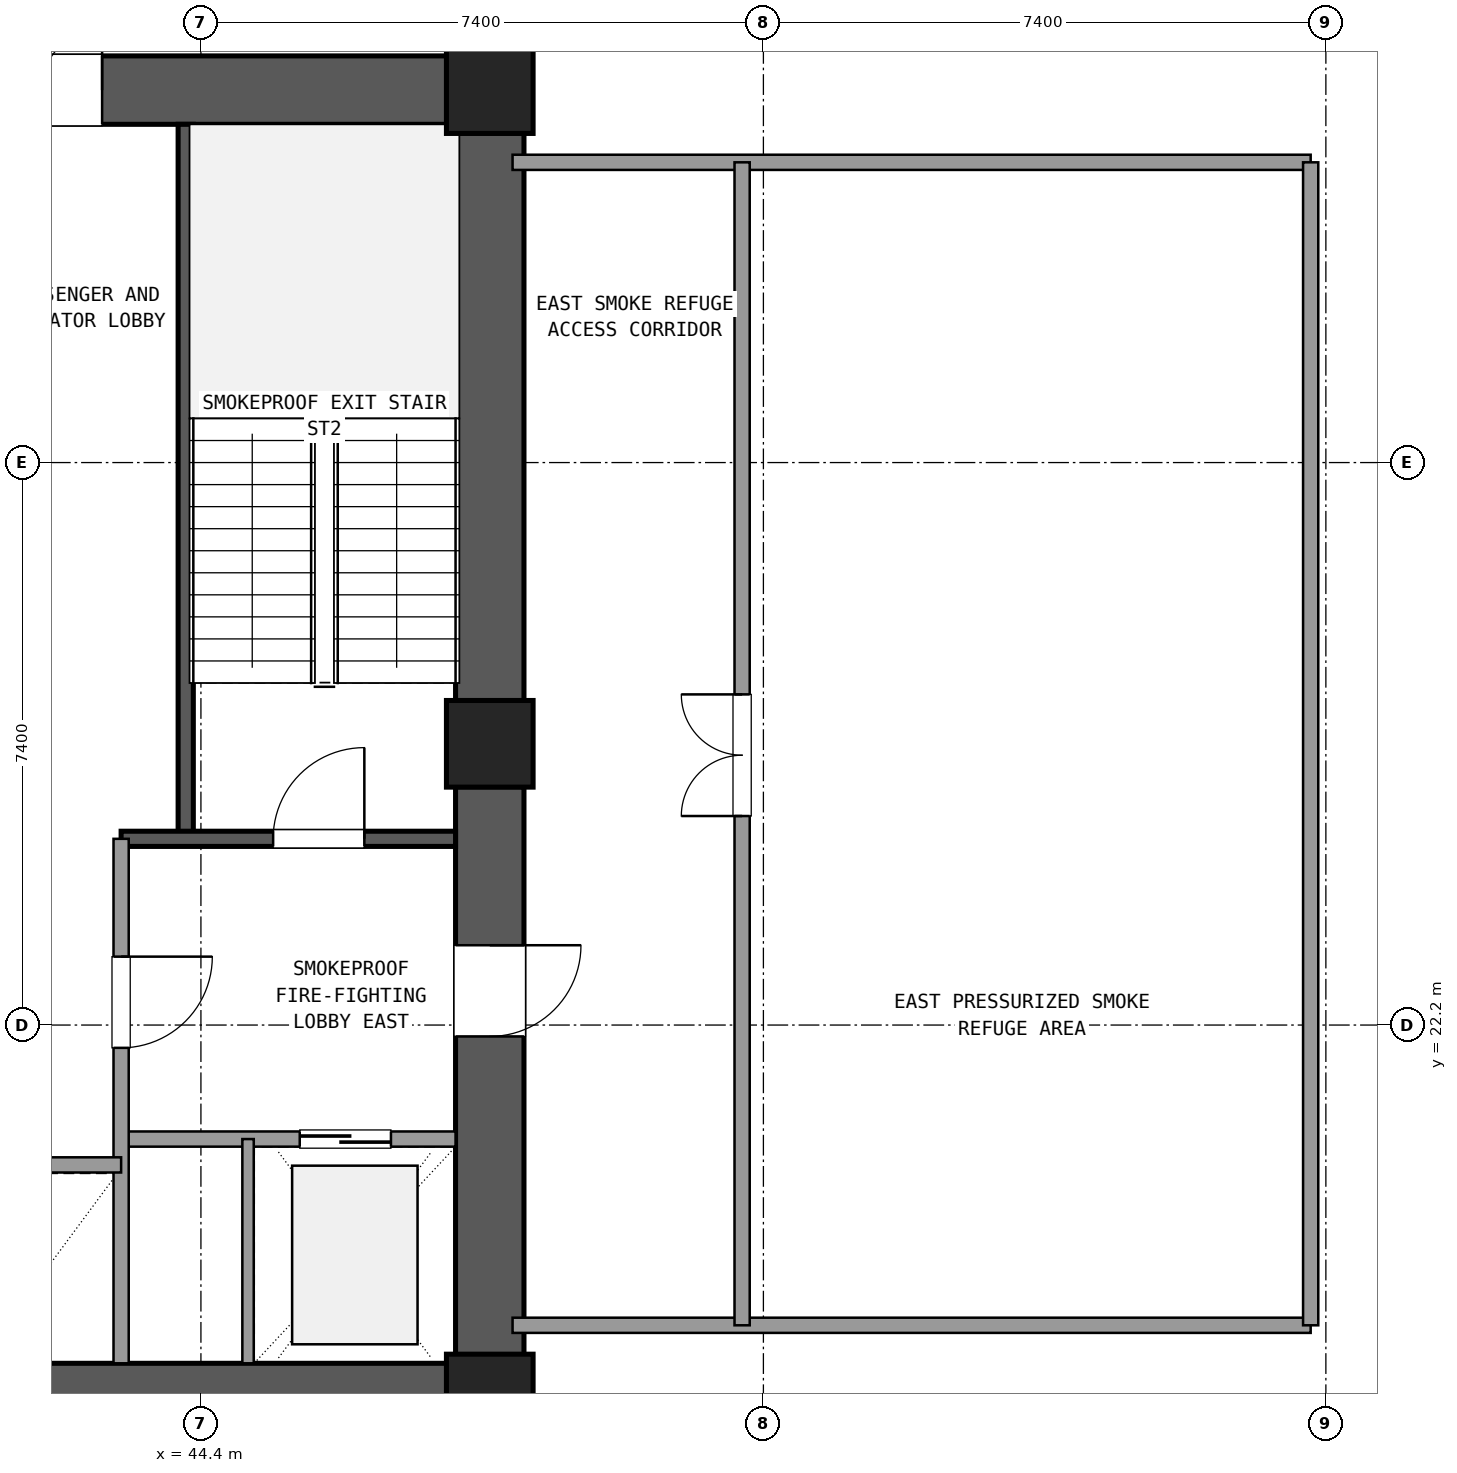
"""IFC4 building model, lengths in metres.
Left out: names, types, materials, properties, quantities, classifications, styles, units other than length and angle.
Written with IfcOpenShell. Run it as: python <this file> out.ifc"""

import sys

from ifc_helpers import new_model, si_unit, direction, frame, frame_2d, origin, origin_2d, place, context, subcontext, project, spatial, rectangle, extrude, element, fill, save


model = new_model("IFC4")
c1 = context("Model", 3, precision=1e-05, world=origin(), true_north=direction((0.0, 1.0)))
c2 = subcontext(c1, "Body", "Model", "MODEL_VIEW")
j1 = project(units=[si_unit("LENGTHUNIT", "METRE"), si_unit("PLANEANGLEUNIT", "RADIAN")], contexts=[c1])
p1 = place(None, origin())
s1 = spatial("IfcSite", under=j1, at=p1, CompositionType="ELEMENT")
p2 = place(p1, origin())
s2 = spatial("IfcBuilding", under=s1, at=p2, CompositionType="ELEMENT")
p3 = place(p2, frame((0.0, 0.0, 70.74)))
s3 = spatial("IfcBuildingStorey", under=s2, at=p3, CompositionType="ELEMENT", Elevation=70.74)
for number, where, z_axis, x_axis in (
    (1, (48.2, 17.3, 0.0), (0.0, 0.0, 1.0), (1.0, 0.0, 0.0)),
    (2, (48.2, 25.9, 0.0), (0.0, 0.0, 1.0), (1.0, 0.0, 0.0)),
    (3, (48.2, 34.5, 0.0), (0.0, 0.0, 1.0), (1.0, 0.0, 0.0)),
):
    element("IfcColumn", number, at=place(p3, frame(where, z_axis=z_axis, x_axis=x_axis)), inside=s3, PredefinedType="COLUMN", context=c2, shape_type="SweptSolid", body=[
        extrude(rectangle(XDim=1.14, YDim=1.14, at=origin_2d()), origin(), (0.0, 0.0, 1.0), 4.68),
    ])
p4 = place(p3, frame((37.565, 17.3, 0.0), z_axis=(0.0, 0.0, 1.0), x_axis=(1.0, 0.0, 0.0)))
e4 = element("IfcWall", 4, at=p4, inside=s3, PredefinedType="SHEAR", context=c2, shape_type="SweptSolid", body=[
    extrude(rectangle(XDim=10.07, YDim=0.9, at=frame_2d((5.035, 0.0))), origin(), (0.0, 0.0, 1.0), 4.38),
])
p5 = place(p3, frame((48.2, 17.865, 0.0), z_axis=(0.0, 0.0, 1.0), x_axis=(0.0, 1.0, 0.0)))
e5 = element("IfcWall", 5, at=p5, inside=s3, PredefinedType="SHEAR", context=c2, shape_type="SweptSolid", body=[
    extrude(rectangle(XDim=7.47, YDim=0.9, at=frame_2d((3.735, 0.0))), origin(), (0.0, 0.0, 1.0), 4.38),
])
p6 = place(p5, frame((4.185, 0.0, 0.0)))
e6 = element("IfcOpeningElement", 6, at=p6, cuts=e5, PredefinedType="OPENING", context=c2, shape_type="SweptSolid", body=[
    extrude(rectangle(XDim=1.2, YDim=2.15, at=frame_2d((0.6, 1.075))), frame((0.0, 0.46, 0.0), z_axis=(0.0, -1.0, 0.0), x_axis=(1.0, 0.0, 0.0)), (0.0, 0.0, 1.0), 0.92),
])
p7 = place(p3, frame((48.2, 26.465, 0.0), z_axis=(0.0, 0.0, 1.0), x_axis=(0.0, 1.0, 0.0)))
e7 = element("IfcWall", 7, at=p7, inside=s3, PredefinedType="SHEAR", context=c2, shape_type="SweptSolid", body=[
    extrude(rectangle(XDim=7.47, YDim=0.9, at=frame_2d((3.735, 0.0))), origin(), (0.0, 0.0, 1.0), 4.38),
])
p8 = place(p3, frame((47.635, 34.5, 0.0), z_axis=(0.0, 0.0, 1.0), x_axis=(-1.0, 0.0, 0.0)))
e8 = element("IfcWall", 8, at=p8, inside=s3, PredefinedType="SHEAR", context=c2, shape_type="SweptSolid", body=[
    extrude(rectangle(XDim=10.07, YDim=0.9, at=frame_2d((5.035, 0.0))), origin(), (0.0, 0.0, 1.0), 4.38),
])
p9 = place(p8, frame((4.535, 0.0, 0.0)))
e9 = element("IfcOpeningElement", 9, at=p9, cuts=e8, PredefinedType="OPENING", context=c2, shape_type="SweptSolid", body=[
    extrude(rectangle(XDim=1.6, YDim=2.2, at=frame_2d((0.8, 1.1))), frame((0.0, 0.46, 0.0), z_axis=(0.0, -1.0, 0.0), x_axis=(1.0, 0.0, 0.0)), (0.0, 0.0, 1.0), 0.92),
])
p10 = place(p3, frame((44.2, 24.65, 0.0), z_axis=(0.0, 0.0, 1.0), x_axis=(0.0, 1.0, 0.0)))
e10 = element("IfcWall", 10, at=p10, inside=s3, PredefinedType="SHEAR", context=c2, shape_type="SweptSolid", body=[
    extrude(rectangle(XDim=9.4, YDim=0.2, at=frame_2d((4.7, 0.0))), origin(), (0.0, 0.0, 1.0), 4.38),
])
p11 = place(p3, frame((43.35, 24.65, 0.0), z_axis=(0.0, 0.0, 1.0), x_axis=(1.0, 0.0, 0.0)))
e11 = element("IfcWall", 11, at=p11, inside=s3, PredefinedType="SHEAR", context=c2, shape_type="SweptSolid", body=[
    extrude(rectangle(XDim=4.4, YDim=0.2, at=frame_2d((2.2, 0.0))), origin(), (0.0, 0.0, 1.0), 4.38),
])
p12 = place(p11, frame((2.0, 0.0, 0.0)))
e12 = element("IfcOpeningElement", 12, at=p12, cuts=e11, PredefinedType="OPENING", context=c2, shape_type="SweptSolid", body=[
    extrude(rectangle(XDim=1.2, YDim=2.15, at=frame_2d((0.6, 1.075))), frame((0.0, 0.11, 0.0), z_axis=(0.0, -1.0, 0.0), x_axis=(1.0, 0.0, 0.0)), (0.0, 0.0, 1.0), 0.22),
])
p13 = place(p3, frame((43.35, 20.7, 0.0), z_axis=(0.0, 0.0, 1.0), x_axis=(1.0, 0.0, 0.0)))
e13 = element("IfcWall", 13, at=p13, inside=s3, PredefinedType="SOLIDWALL", context=c2, shape_type="SweptSolid", body=[
    extrude(rectangle(XDim=4.4, YDim=0.2, at=frame_2d((2.2, 0.0))), origin(), (0.0, 0.0, 1.0), 2.75),
])
p14 = place(p13, frame((2.35, 0.0, 0.0)))
e14 = element("IfcOpeningElement", 14, at=p14, cuts=e13, PredefinedType="OPENING", context=c2, shape_type="SweptSolid", body=[
    extrude(rectangle(XDim=1.2, YDim=2.15, at=frame_2d((0.6, 1.075))), frame((0.0, 0.11, 0.0), z_axis=(0.0, -1.0, 0.0), x_axis=(1.0, 0.0, 0.0)), (0.0, 0.0, 1.0), 0.22),
])
p15 = place(p3, frame((43.35, 17.75, 0.0), z_axis=(0.0, 0.0, 1.0), x_axis=(0.0, 1.0, 0.0)))
e15 = element("IfcWall", 15, at=p15, inside=s3, PredefinedType="SOLIDWALL", context=c2, shape_type="SweptSolid", body=[
    extrude(rectangle(XDim=6.9, YDim=0.2, at=frame_2d((3.45, 0.0))), origin(), (0.0, 0.0, 1.0), 2.75),
])
p16 = place(p15, frame((4.15, 0.0, 0.0)))
e16 = element("IfcOpeningElement", 16, at=p16, cuts=e15, PredefinedType="OPENING", context=c2, shape_type="SweptSolid", body=[
    extrude(rectangle(XDim=1.2, YDim=2.15, at=frame_2d((0.6, 1.075))), frame((0.0, 0.11, 0.0), z_axis=(0.0, -1.0, 0.0), x_axis=(1.0, 0.0, 0.0)), (0.0, 0.0, 1.0), 0.22),
])
p17 = place(p3, frame((45.02, 17.75, 0.0), z_axis=(0.0, 0.0, 1.0), x_axis=(0.0, 1.0, 0.0)))
e17 = element("IfcWall", 17, at=p17, inside=s3, PredefinedType="PARTITIONING", context=c2, shape_type="SweptSolid", body=[
    extrude(rectangle(XDim=2.95, YDim=0.15, at=frame_2d((1.475, 0.0))), origin(), (0.0, 0.0, 1.0), 2.75),
])
p18 = place(p3, frame((37.25, 20.36, 0.0), z_axis=(0.0, 0.0, 1.0), x_axis=(1.0, 0.0, 0.0)))
e18 = element("IfcWall", 18, at=p18, inside=s3, PredefinedType="SOLIDWALL", context=c2, shape_type="SweptSolid", body=[
    extrude(rectangle(XDim=6.1, YDim=0.2, at=frame_2d((3.05, 0.0))), origin(), (0.0, 0.0, 1.0), 2.75),
])
p19 = place(p3, frame((48.0, 34.8, 0.0), z_axis=(0.0, 0.0, 1.0), x_axis=(0.0, 1.0, 0.0)))
e19 = element("IfcWall", 19, at=p19, inside=s3, PredefinedType="SOLIDWALL", context=c2, shape_type="SweptSolid", body=[
    extrude(rectangle(XDim=10.4, YDim=0.2, at=frame_2d((5.2, 0.0))), origin(), (0.0, 0.0, 1.0), 2.75),
])
for number, where, z_axis, x_axis in (
    (20, (48.5, 18.25, 0.0), (0.0, 0.0, 1.0), (1.0, 0.0, 0.0)),
    (21, (48.5, 33.55, 0.0), (0.0, 0.0, 1.0), (1.0, 0.0, 0.0)),
):
    element("IfcWall", number, at=place(p3, frame(where, z_axis=z_axis, x_axis=x_axis)), inside=s3, PredefinedType="SOLIDWALL", context=c2, shape_type="SweptSolid", body=[
        extrude(rectangle(XDim=10.5, YDim=0.2, at=frame_2d((5.25, 0.0))), origin(), (0.0, 0.0, 1.0), 2.75),
    ])
p20 = place(p3, frame((59.0, 18.25, 0.0), z_axis=(0.0, 0.0, 1.0), x_axis=(0.0, 1.0, 0.0)))
e22 = element("IfcWall", 22, at=p20, inside=s3, PredefinedType="SOLIDWALL", context=c2, shape_type="SweptSolid", body=[
    extrude(rectangle(XDim=15.3, YDim=0.2, at=frame_2d((7.65, 0.0))), origin(), (0.0, 0.0, 1.0), 2.75),
])
p21 = place(p3, frame((51.52, 18.25, 0.0), z_axis=(0.0, 0.0, 1.0), x_axis=(0.0, 1.0, 0.0)))
e23 = element("IfcWall", 23, at=p21, inside=s3, PredefinedType="SOLIDWALL", context=c2, shape_type="SweptSolid", body=[
    extrude(rectangle(XDim=15.3, YDim=0.2, at=frame_2d((7.65, 0.0))), origin(), (0.0, 0.0, 1.0), 2.75),
])
p22 = place(p21, frame((6.7, 0.0, 0.0)))
e24 = element("IfcOpeningElement", 24, at=p22, cuts=e23, PredefinedType="OPENING", context=c2, shape_type="SweptSolid", body=[
    extrude(rectangle(XDim=1.6, YDim=2.2, at=frame_2d((0.8, 1.1))), frame((0.0, 0.11, 0.0), z_axis=(0.0, -1.0, 0.0), x_axis=(1.0, 0.0, 0.0)), (0.0, 0.0, 1.0), 0.22),
])
p23 = place(p12, origin())
e25 = element("IfcDoor", 25, at=p23, inside=s3, OperationType="SINGLE_SWING_RIGHT", PredefinedType="DOOR", context=c2, shape_type="SweptSolid", body=[
    extrude(rectangle(XDim=1.2, YDim=2.15, at=frame_2d((0.6, 1.075))), frame((0.0, 0.025, 0.0), z_axis=(0.0, -1.0, 0.0), x_axis=(1.0, 0.0, 0.0)), (0.0, 0.0, 1.0), 0.05),
])
fill(e12, e25)
p24 = place(p14, origin())
e26 = element("IfcDoor", 26, at=p24, inside=s3, OperationType="SLIDING_TO_RIGHT", PredefinedType="DOOR", context=c2, shape_type="SweptSolid", body=[
    extrude(rectangle(XDim=1.2, YDim=2.15, at=frame_2d((0.6, 1.075))), frame((0.0, 0.025, 0.0), z_axis=(0.0, -1.0, 0.0), x_axis=(1.0, 0.0, 0.0)), (0.0, 0.0, 1.0), 0.05),
])
fill(e14, e26)
p25 = place(p16, frame((1.2, 0.0, 0.0), z_axis=(0.0, 0.0, 1.0), x_axis=(-1.0, 0.0, 0.0)))
e27 = element("IfcDoor", 27, at=p25, inside=s3, OperationType="SINGLE_SWING_RIGHT", PredefinedType="DOOR", context=c2, shape_type="SweptSolid", body=[
    extrude(rectangle(XDim=1.2, YDim=2.15, at=frame_2d((0.6, 1.075))), frame((0.0, 0.025, 0.0), z_axis=(0.0, -1.0, 0.0), x_axis=(1.0, 0.0, 0.0)), (0.0, 0.0, 1.0), 0.05),
])
fill(e16, e27)
p26 = place(p6, frame((1.2, 0.0, 0.0), z_axis=(0.0, 0.0, 1.0), x_axis=(-1.0, 0.0, 0.0)))
e28 = element("IfcDoor", 28, at=p26, inside=s3, OperationType="SINGLE_SWING_RIGHT", PredefinedType="DOOR", context=c2, shape_type="SweptSolid", body=[
    extrude(rectangle(XDim=1.2, YDim=2.15, at=frame_2d((0.6, 1.075))), frame((0.0, 0.025, 0.0), z_axis=(0.0, -1.0, 0.0), x_axis=(1.0, 0.0, 0.0)), (0.0, 0.0, 1.0), 0.05),
])
fill(e6, e28)
p27 = place(p9, frame((1.6, 0.0, 0.0), z_axis=(0.0, 0.0, 1.0), x_axis=(-1.0, 0.0, 0.0)))
e29 = element("IfcDoor", 29, at=p27, inside=s3, OperationType="DOUBLE_DOOR_SINGLE_SWING", PredefinedType="DOOR", context=c2, shape_type="SweptSolid", body=[
    extrude(rectangle(XDim=1.6, YDim=2.2, at=frame_2d((0.8, 1.1))), frame((0.0, 0.025, 0.0), z_axis=(0.0, -1.0, 0.0), x_axis=(1.0, 0.0, 0.0)), (0.0, 0.0, 1.0), 0.05),
])
fill(e9, e29)
p28 = place(p22, origin())
e30 = element("IfcDoor", 30, at=p28, inside=s3, OperationType="DOUBLE_DOOR_SINGLE_SWING", PredefinedType="DOOR", context=c2, shape_type="SweptSolid", body=[
    extrude(rectangle(XDim=1.6, YDim=2.2, at=frame_2d((0.8, 1.1))), frame((0.0, 0.025, 0.0), z_axis=(0.0, -1.0, 0.0), x_axis=(1.0, 0.0, 0.0)), (0.0, 0.0, 1.0), 0.05),
])
fill(e24, e30)
save(model, sys.argv[1])
